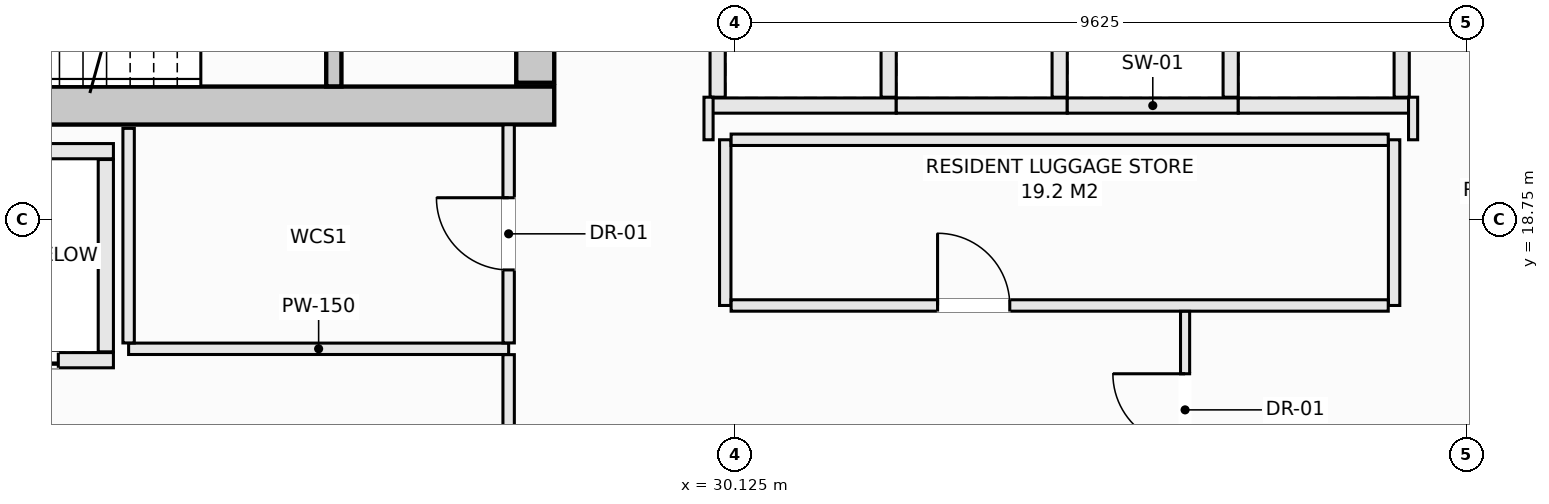
"""IFC4 building model, lengths in metres.
Left out: names, types, materials, properties, quantities, classifications, styles, units other than length and angle.
Written with IfcOpenShell. Run it as: python <this file> out.ifc"""

import sys

from ifc_helpers import new_model, si_unit, direction, frame, frame_2d, origin, place, context, subcontext, project, spatial, rectangle, extrude, element, fill, save


model = new_model("IFC4")
c1 = context("Model", 3, precision=1e-05, world=origin(), true_north=direction((0.0, 1.0)))
c2 = subcontext(c1, "Body", "Model", "MODEL_VIEW")
j1 = project(units=[si_unit("LENGTHUNIT", "METRE"), si_unit("PLANEANGLEUNIT", "RADIAN")], contexts=[c1])
p1 = place(None, origin())
s1 = spatial("IfcSite", under=j1, at=p1, CompositionType="ELEMENT")
p2 = place(p1, origin())
s2 = spatial("IfcBuilding", under=s1, at=p2, CompositionType="ELEMENT")
p3 = place(p2, frame((0.0, 0.0, 222.8)))
s3 = spatial("IfcBuildingStorey", under=s2, at=p3, CompositionType="ELEMENT", Elevation=222.8)
p4 = place(p3, frame((14.25, 20.25, -0.27), z_axis=(0.0, 0.0, 1.0), x_axis=(1.0, 0.0, 0.0)))
e1 = element("IfcWall", 1, at=p4, inside=s3, PredefinedType="SHEAR", context=c2, shape_type="SweptSolid", body=[
    extrude(rectangle(XDim=13.5, YDim=0.5, at=frame_2d((6.75, 0.0))), origin(), (0.0, 0.0, 1.0), 3.3),
])
p5 = place(p3, frame((27.5, 20.55, -0.27), z_axis=(0.0, 0.0, 1.0), x_axis=(0.0, 1.0, 0.0)))
e2 = element("IfcWall", 2, at=p5, inside=s3, PredefinedType="SHEAR", context=c2, shape_type="SweptSolid", body=[
    extrude(rectangle(XDim=1.5, YDim=0.5, at=frame_2d((0.75, 0.0))), origin(), (0.0, 0.0, 1.0), 3.3),
])
p6 = place(p3, frame((24.85, 20.502, -0.27), z_axis=(0.0, 0.0, 1.0), x_axis=(0.0, 1.0, 0.0)))
e3 = element("IfcWall", 3, at=p6, inside=s3, PredefinedType="SHEAR", context=c2, shape_type="SweptSolid", body=[
    extrude(rectangle(XDim=3.038, YDim=0.2, at=frame_2d((1.519, 0.0))), origin(), (0.0, 0.0, 1.0), 3.3),
])
p7 = place(p6, frame((0.969, 0.0, 0.27)))
e4 = element("IfcOpeningElement", 4, at=p7, cuts=e3, PredefinedType="OPENING", context=c2, shape_type="SweptSolid", body=[
    extrude(rectangle(XDim=1.1, YDim=2.15, at=frame_2d((0.55, 1.075))), frame((0.0, 0.11, 0.0), z_axis=(0.0, -1.0, 0.0), x_axis=(1.0, 0.0, 0.0)), (0.0, 0.0, 1.0), 0.22),
])
p8 = place(p3, frame((19.4, 19.65, 0.0), z_axis=(0.0, 0.0, 1.0), x_axis=(1.0, 0.0, 0.0)))
e5 = element("IfcWall", 5, at=p8, inside=s3, PredefinedType="SOLIDWALL", context=c2, shape_type="SweptSolid", body=[
    extrude(rectangle(XDim=2.55, YDim=0.2, at=frame_2d((1.275, 0.0))), origin(), (0.0, 0.0, 1.0), 3.03),
])
p9 = place(p3, frame((19.4, 16.9, 0.0), z_axis=(0.0, 0.0, 1.0), x_axis=(1.0, 0.0, 0.0)))
e6 = element("IfcWall", 6, at=p9, inside=s3, PredefinedType="SOLIDWALL", context=c2, shape_type="SweptSolid", body=[
    extrude(rectangle(XDim=2.55, YDim=0.2, at=frame_2d((1.275, 0.0))), origin(), (0.0, 0.0, 1.0), 3.03),
])
p10 = place(p9, frame((0.725, 0.0, 0.0)))
e7 = element("IfcOpeningElement", 7, at=p10, cuts=e6, PredefinedType="OPENING", context=c2, shape_type="SweptSolid", body=[
    extrude(rectangle(XDim=1.1, YDim=2.2, at=frame_2d((0.55, 1.1))), frame((0.0, 0.11, 0.0), z_axis=(0.0, -1.0, 0.0), x_axis=(1.0, 0.0, 0.0)), (0.0, 0.0, 1.0), 0.22),
])
p11 = place(p3, frame((21.85, 17.01, 0.0), z_axis=(0.0, 0.0, 1.0), x_axis=(0.0, 1.0, 0.0)))
e8 = element("IfcWall", 8, at=p11, inside=s3, PredefinedType="SOLIDWALL", context=c2, shape_type="SweptSolid", body=[
    extrude(rectangle(XDim=2.53, YDim=0.2, at=frame_2d((1.265, 0.0))), origin(), (0.0, 0.0, 1.0), 3.03),
])
p12 = place(p3, frame((29.8, 20.25, 0.0), z_axis=(0.0, 0.0, 1.0), x_axis=(1.0, 0.0, 0.0)))
e9 = element("IfcWall", 9, at=p12, inside=s3, PredefinedType="SOLIDWALL", context=c2, shape_type="SweptSolid", body=[
    extrude(rectangle(XDim=2.45, YDim=0.2, at=frame_2d((1.225, 0.0))), origin(), (0.0, 0.0, 1.0), 3.03),
])
for number, where, z_axis, x_axis in (
    (10, (29.9, 20.36, 0.0), (0.0, 0.0, 1.0), (0.0, 1.0, 0.0)),
    (11, (32.15, 20.36, 0.0), (0.0, 0.0, 1.0), (0.0, 1.0, 0.0)),
):
    element("IfcWall", number, at=place(p3, frame(where, z_axis=z_axis, x_axis=x_axis)), inside=s3, PredefinedType="SOLIDWALL", context=c2, shape_type="SweptSolid", body=[
        extrude(rectangle(XDim=2.43, YDim=0.2, at=frame_2d((1.215, 0.0))), origin(), (0.0, 0.0, 1.0), 3.03),
    ])
p13 = place(p3, frame((32.25, 20.25, 0.0), z_axis=(0.0, 0.0, 1.0), x_axis=(1.0, 0.0, 0.0)))
e12 = element("IfcWall", 12, at=p13, inside=s3, PredefinedType="SOLIDWALL", context=c2, shape_type="SweptSolid", body=[
    extrude(rectangle(XDim=2.25, YDim=0.2, at=frame_2d((1.125, 0.0))), origin(), (0.0, 0.0, 1.0), 3.03),
])
p14 = place(p3, frame((34.4, 20.36, 0.0), z_axis=(0.0, 0.0, 1.0), x_axis=(0.0, 1.0, 0.0)))
e13 = element("IfcWall", 13, at=p14, inside=s3, PredefinedType="SOLIDWALL", context=c2, shape_type="SweptSolid", body=[
    extrude(rectangle(XDim=2.43, YDim=0.2, at=frame_2d((1.215, 0.0))), origin(), (0.0, 0.0, 1.0), 3.03),
])
p15 = place(p3, frame((34.5, 20.25, 0.0), z_axis=(0.0, 0.0, 1.0), x_axis=(1.0, 0.0, 0.0)))
e14 = element("IfcWall", 14, at=p15, inside=s3, PredefinedType="SOLIDWALL", context=c2, shape_type="SweptSolid", body=[
    extrude(rectangle(XDim=2.25, YDim=0.2, at=frame_2d((1.125, 0.0))), origin(), (0.0, 0.0, 1.0), 3.03),
])
p16 = place(p3, frame((36.65, 20.36, 0.0), z_axis=(0.0, 0.0, 1.0), x_axis=(0.0, 1.0, 0.0)))
e15 = element("IfcWall", 15, at=p16, inside=s3, PredefinedType="SOLIDWALL", context=c2, shape_type="SweptSolid", body=[
    extrude(rectangle(XDim=2.43, YDim=0.2, at=frame_2d((1.215, 0.0))), origin(), (0.0, 0.0, 1.0), 3.03),
])
p17 = place(p3, frame((36.75, 20.25, 0.0), z_axis=(0.0, 0.0, 1.0), x_axis=(1.0, 0.0, 0.0)))
e16 = element("IfcWall", 16, at=p17, inside=s3, PredefinedType="SOLIDWALL", context=c2, shape_type="SweptSolid", body=[
    extrude(rectangle(XDim=2.25, YDim=0.2, at=frame_2d((1.125, 0.0))), origin(), (0.0, 0.0, 1.0), 3.03),
])
p18 = place(p3, frame((38.9, 20.36, 0.0), z_axis=(0.0, 0.0, 1.0), x_axis=(0.0, 1.0, 0.0)))
e17 = element("IfcWall", 17, at=p18, inside=s3, PredefinedType="SOLIDWALL", context=c2, shape_type="SweptSolid", body=[
    extrude(rectangle(XDim=2.43, YDim=0.2, at=frame_2d((1.215, 0.0))), origin(), (0.0, 0.0, 1.0), 3.03),
])
p19 = place(p3, frame((22.15, 17.05, 0.0), z_axis=(0.0, 0.0, 1.0), x_axis=(1.0, 0.0, 0.0)))
e18 = element("IfcWall", 18, at=p19, inside=s3, PredefinedType="PARTITIONING", context=c2, shape_type="SweptSolid", body=[
    extrude(rectangle(XDim=5.0, YDim=0.15, at=frame_2d((2.5, 0.0))), origin(), (0.0, 0.0, 1.0), 3.03),
])
p20 = place(p3, frame((22.15, 17.127, 0.0), z_axis=(0.0, 0.0, 1.0), x_axis=(0.0, 1.0, 0.0)))
e19 = element("IfcWall", 19, at=p20, inside=s3, PredefinedType="PARTITIONING", context=c2, shape_type="SweptSolid", body=[
    extrude(rectangle(XDim=2.823, YDim=0.15, at=frame_2d((1.412, 0.0))), origin(), (0.0, 0.0, 1.0), 3.03),
])
p21 = place(p3, frame((27.15, 11.75, 0.0), z_axis=(0.0, 0.0, 1.0), x_axis=(0.0, 1.0, 0.0)))
e20 = element("IfcWall", 20, at=p21, inside=s3, PredefinedType="PARTITIONING", context=c2, shape_type="SweptSolid", body=[
    extrude(rectangle(XDim=5.223, YDim=0.15, at=frame_2d((2.611, 0.0))), origin(), (0.0, 0.0, 1.0), 3.03),
])
p22 = place(p21, frame((2.648, 0.0, 0.0)))
e21 = element("IfcOpeningElement", 21, at=p22, cuts=e20, PredefinedType="OPENING", context=c2, shape_type="SweptSolid", body=[
    extrude(rectangle(XDim=0.95, YDim=2.1, at=frame_2d((0.475, 1.05))), frame((0.0, 0.085, 0.0), z_axis=(0.0, -1.0, 0.0), x_axis=(1.0, 0.0, 0.0)), (0.0, 0.0, 1.0), 0.17),
])
p23 = place(p3, frame((27.15, 17.127, 0.0), z_axis=(0.0, 0.0, 1.0), x_axis=(0.0, 1.0, 0.0)))
e22 = element("IfcWall", 22, at=p23, inside=s3, PredefinedType="PARTITIONING", context=c2, shape_type="SweptSolid", body=[
    extrude(rectangle(XDim=2.871, YDim=0.15, at=frame_2d((1.436, 0.0))), origin(), (0.0, 0.0, 1.0), 3.03),
])
p24 = place(p23, frame((0.96, 0.0, 0.0)))
e23 = element("IfcOpeningElement", 23, at=p24, cuts=e22, PredefinedType="OPENING", context=c2, shape_type="SweptSolid", body=[
    extrude(rectangle(XDim=0.95, YDim=2.1, at=frame_2d((0.475, 1.05))), frame((0.0, 0.085, 0.0), z_axis=(0.0, -1.0, 0.0), x_axis=(1.0, 0.0, 0.0)), (0.0, 0.0, 1.0), 0.17),
])
for number, where, z_axis, x_axis in (
    (24, (30.0, 17.62, 0.0), (0.0, 0.0, 1.0), (0.0, 1.0, 0.0)),
    (25, (38.8, 17.62, 0.0), (0.0, 0.0, 1.0), (0.0, 1.0, 0.0)),
):
    element("IfcWall", number, at=place(p3, frame(where, z_axis=z_axis, x_axis=x_axis)), inside=s3, PredefinedType="PARTITIONING", context=c2, shape_type="SweptSolid", body=[
        extrude(rectangle(XDim=2.18, YDim=0.15, at=frame_2d((1.09, 0.0))), origin(), (0.0, 0.0, 1.0), 3.03),
    ])
p25 = place(p3, frame((30.077, 17.62, 0.0), z_axis=(0.0, 0.0, 1.0), x_axis=(1.0, 0.0, 0.0)))
e26 = element("IfcWall", 26, at=p25, inside=s3, PredefinedType="PARTITIONING", context=c2, shape_type="SweptSolid", body=[
    extrude(rectangle(XDim=8.646, YDim=0.15, at=frame_2d((4.323, 0.0))), origin(), (0.0, 0.0, 1.0), 3.03),
])
p26 = place(p25, frame((2.717, 0.0, 0.0)))
e27 = element("IfcOpeningElement", 27, at=p26, cuts=e26, PredefinedType="OPENING", context=c2, shape_type="SweptSolid", body=[
    extrude(rectangle(XDim=0.95, YDim=2.1, at=frame_2d((0.475, 1.05))), frame((0.0, 0.085, 0.0), z_axis=(0.0, -1.0, 0.0), x_axis=(1.0, 0.0, 0.0)), (0.0, 0.0, 1.0), 0.17),
])
p27 = place(p3, frame((30.077, 19.8, 0.0), z_axis=(0.0, 0.0, 1.0), x_axis=(1.0, 0.0, 0.0)))
e28 = element("IfcWall", 28, at=p27, inside=s3, PredefinedType="PARTITIONING", context=c2, shape_type="SweptSolid", body=[
    extrude(rectangle(XDim=8.646, YDim=0.15, at=frame_2d((4.323, 0.0))), origin(), (0.0, 0.0, 1.0), 3.03),
])
for number, where, z_axis, x_axis in (
    (29, (39.05, 19.8, 0.0), (0.0, 0.0, 1.0), (0.0, 1.0, 0.0)),
    (30, (29.78, 19.8, 0.0), (0.0, 0.0, 1.0), (0.0, 1.0, 0.0)),
):
    element("IfcWall", number, at=place(p3, frame(where, z_axis=z_axis, x_axis=x_axis)), inside=s3, PredefinedType="PARTITIONING", context=c2, shape_type="SweptSolid", body=[
        extrude(rectangle(XDim=0.56, YDim=0.12, at=frame_2d((0.28, 0.0))), origin(), (0.0, 0.0, 1.0), 3.03),
    ])
p28 = place(p3, frame((36.05, 14.95, 0.0), z_axis=(0.0, 0.0, 1.0), x_axis=(0.0, 1.0, 0.0)))
e31 = element("IfcWall", 31, at=p28, inside=s3, PredefinedType="PARTITIONING", context=c2, shape_type="SweptSolid", body=[
    extrude(rectangle(XDim=2.593, YDim=0.12, at=frame_2d((1.296, 0.0))), origin(), (0.0, 0.0, 1.0), 3.03),
])
p29 = place(p28, frame((0.822, 0.0, 0.0)))
e32 = element("IfcOpeningElement", 32, at=p29, cuts=e31, PredefinedType="OPENING", context=c2, shape_type="SweptSolid", body=[
    extrude(rectangle(XDim=0.95, YDim=2.1, at=frame_2d((0.475, 1.05))), frame((0.0, 0.07, 0.0), z_axis=(0.0, -1.0, 0.0), x_axis=(1.0, 0.0, 0.0)), (0.0, 0.0, 1.0), 0.14),
])
p30 = place(p3, frame((8.135, 18.504, 0.0), z_axis=(0.0, 0.0, 1.0), x_axis=(0.963142154711, -0.268992917785, 0.0)))
e33 = element("IfcWall", 33, at=p30, inside=s3, PredefinedType="PARTITIONING", context=c2, shape_type="SweptSolid", body=[
    extrude(rectangle(XDim=19.662, YDim=0.12, at=frame_2d((9.831, 0.0))), origin(), (0.0, 0.0, 1.0), 2.77),
])
p31 = place(p3, frame((36.012, 13.247, 0.0), z_axis=(0.0, 0.0, 1.0), x_axis=(0.85474937032, 0.519040955934, 0.0)))
e34 = element("IfcWall", 34, at=p31, inside=s3, PredefinedType="PARTITIONING", context=c2, shape_type="SweptSolid", body=[
    extrude(rectangle(XDim=10.04, YDim=0.12, at=frame_2d((5.02, 0.0))), origin(), (0.0, 0.0, 1.0), 3.03),
])
p32 = place(p3, frame((39.706, 22.958, 0.0), z_axis=(0.0, 0.0, 1.0), x_axis=(0.73633751064, -0.676614417837, 0.0)))
e35 = element("IfcWall", 35, at=p32, inside=s3, PredefinedType="PARTITIONING", context=c2, shape_type="SweptSolid", body=[
    extrude(rectangle(XDim=6.582, YDim=0.12, at=frame_2d((3.291, 0.0))), origin(), (0.0, 0.0, 1.0), 3.03),
])
p33 = place(p10, origin())
e36 = element("IfcDoor", 36, at=p33, inside=s3, OperationType="SLIDING_TO_LEFT", PredefinedType="DOOR", context=c2, shape_type="SweptSolid", body=[
    extrude(rectangle(XDim=1.1, YDim=2.2, at=frame_2d((0.55, 1.1))), frame((0.0, 0.025, 0.0), z_axis=(0.0, -1.0, 0.0), x_axis=(1.0, 0.0, 0.0)), (0.0, 0.0, 1.0), 0.05),
])
fill(e7, e36)
p34 = place(p24, origin())
e37 = element("IfcDoor", 37, at=p34, inside=s3, OperationType="SINGLE_SWING_RIGHT", PredefinedType="DOOR", context=c2, shape_type="SweptSolid", body=[
    extrude(rectangle(XDim=0.95, YDim=2.1, at=frame_2d((0.475, 1.05))), frame((0.0, 0.025, 0.0), z_axis=(0.0, -1.0, 0.0), x_axis=(1.0, 0.0, 0.0)), (0.0, 0.0, 1.0), 0.05),
])
fill(e23, e37)
p35 = place(p26, origin())
e38 = element("IfcDoor", 38, at=p35, inside=s3, OperationType="SINGLE_SWING_LEFT", PredefinedType="DOOR", context=c2, shape_type="SweptSolid", body=[
    extrude(rectangle(XDim=0.95, YDim=2.1, at=frame_2d((0.475, 1.05))), frame((0.0, 0.025, 0.0), z_axis=(0.0, -1.0, 0.0), x_axis=(1.0, 0.0, 0.0)), (0.0, 0.0, 1.0), 0.05),
])
fill(e27, e38)
p36 = place(p29, origin())
e39 = element("IfcDoor", 39, at=p36, inside=s3, OperationType="SINGLE_SWING_RIGHT", PredefinedType="DOOR", context=c2, shape_type="SweptSolid", body=[
    extrude(rectangle(XDim=0.95, YDim=2.1, at=frame_2d((0.475, 1.05))), frame((0.0, 0.025, 0.0), z_axis=(0.0, -1.0, 0.0), x_axis=(1.0, 0.0, 0.0)), (0.0, 0.0, 1.0), 0.05),
])
fill(e32, e39)
save(model, sys.argv[1])
